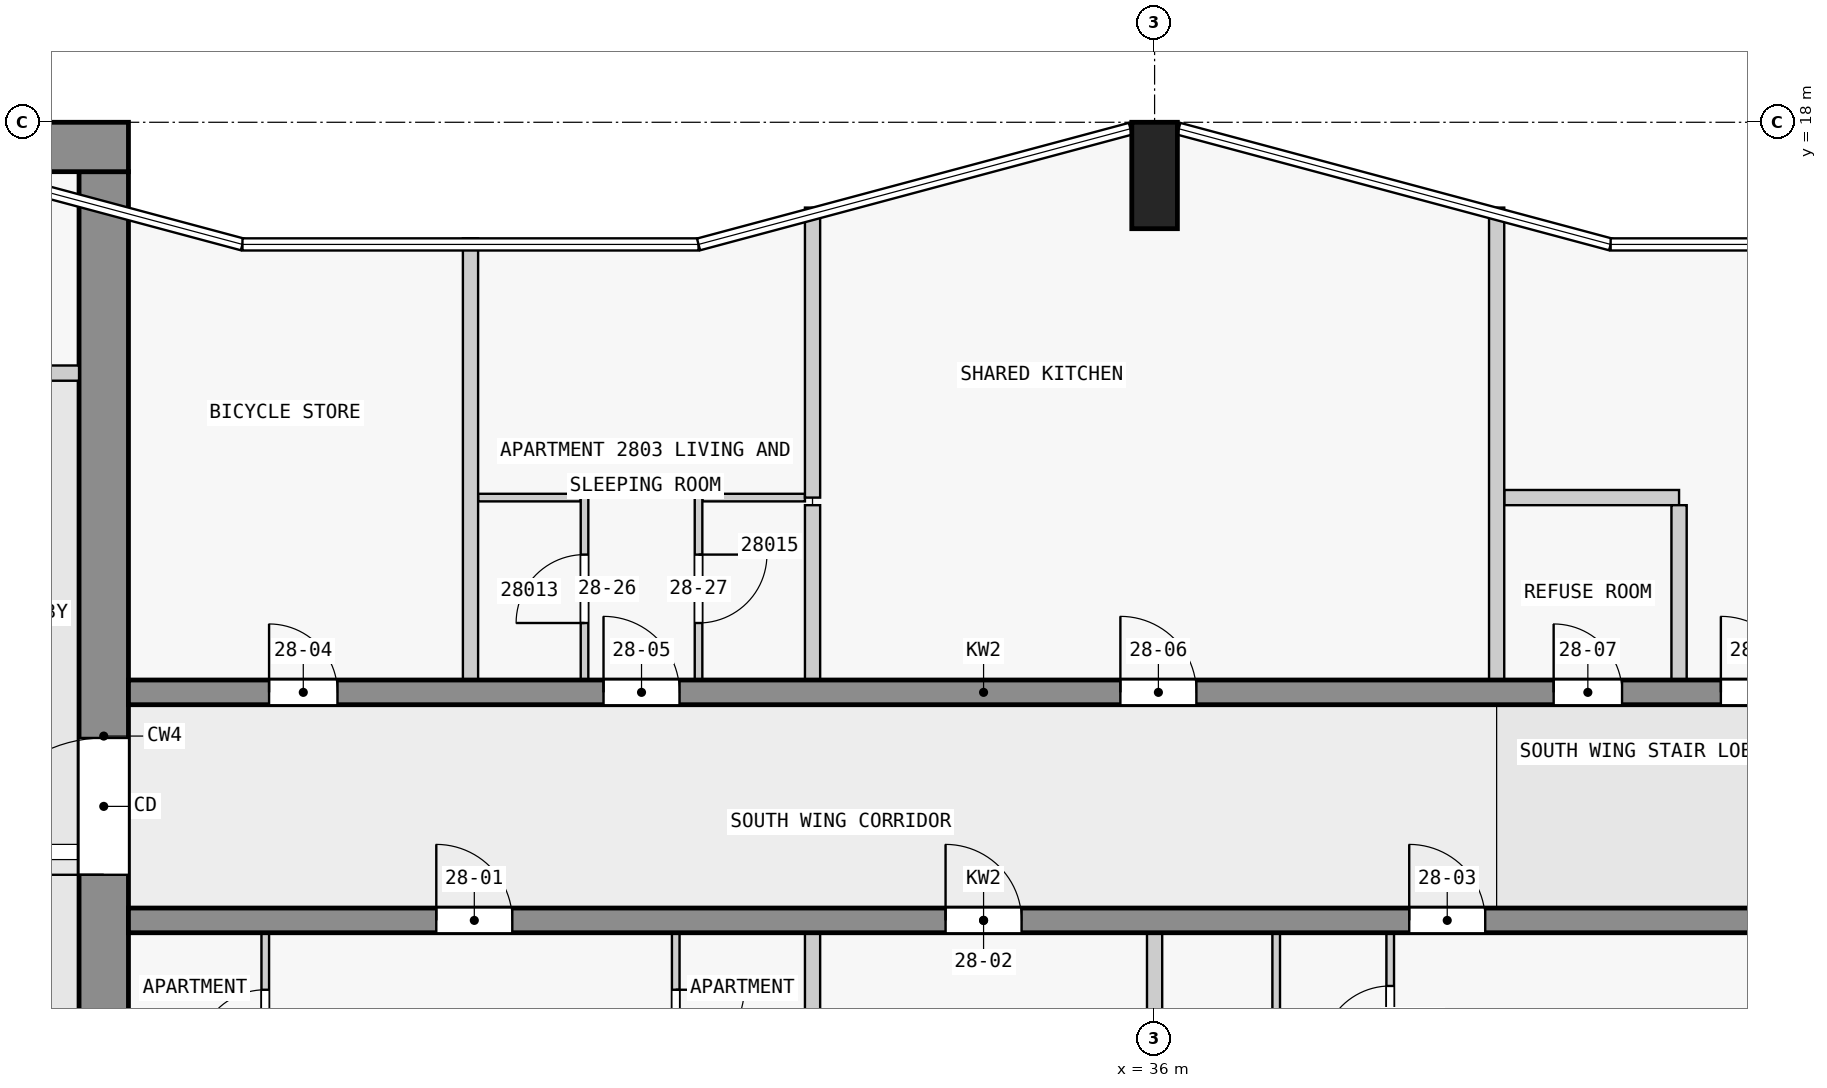
"""IFC4 building model, lengths in metres.
Left out: names, types, materials, properties, quantities, classifications, styles, units other than length and angle.
Written with IfcOpenShell. Run it as: python <this file> out.ifc"""

import sys

from ifc_helpers import new_model, si_unit, direction, frame, frame_2d, origin, origin_2d, place, context, subcontext, project, spatial, rectangle, extrude, element, fill, save


model = new_model("IFC4")
c1 = context("Model", 3, precision=1e-05, world=origin(), true_north=direction((0.0, 1.0)))
c2 = subcontext(c1, "Body", "Model", "MODEL_VIEW")
j1 = project(units=[si_unit("LENGTHUNIT", "METRE"), si_unit("PLANEANGLEUNIT", "RADIAN")], contexts=[c1])
p1 = place(None, origin())
s1 = spatial("IfcSite", under=j1, at=p1, CompositionType="ELEMENT")
p2 = place(p1, origin())
s2 = spatial("IfcBuilding", under=s1, at=p2, CompositionType="ELEMENT")
p3 = place(p2, frame((0.0, 0.0, 109.8)))
s3 = spatial("IfcBuildingStorey", under=s2, at=p3, CompositionType="ELEMENT", Elevation=109.8)
p4 = place(p3, frame((36.0, 17.3, 0.0), z_axis=(0.0, 0.0, 1.0), x_axis=(1.0, 0.0, 0.0)))
e1 = element("IfcColumn", 1, at=p4, inside=s3, PredefinedType="COLUMN", context=c2, shape_type="SweptSolid", body=[
    extrude(rectangle(XDim=0.6, YDim=1.4, at=origin_2d()), origin(), (0.0, 0.0, 1.0), 3.5),
])
p5 = place(p3, frame((1.65, 17.675, 0.0), z_axis=(0.0, 0.0, 1.0), x_axis=(1.0, 0.0, 0.0)))
e2 = element("IfcWall", 2, at=p5, inside=s3, PredefinedType="SHEAR", context=c2, shape_type="SweptSolid", body=[
    extrude(rectangle(XDim=20.85, YDim=0.65, at=frame_2d((10.425, 0.0))), origin(), (0.0, 0.0, 1.0), 3.25),
])
p6 = place(p5, frame((6.45, 0.0, 0.0)))
e3 = element("IfcOpeningElement", 3, at=p6, cuts=e2, PredefinedType="OPENING", context=c2, shape_type="SweptSolid", body=[
    extrude(rectangle(XDim=1.8, YDim=2.1, at=frame_2d((0.9, 1.05))), frame((0.0, 0.335, 0.0), z_axis=(0.0, -1.0, 0.0), x_axis=(1.0, 0.0, 0.0)), (0.0, 0.0, 1.0), 0.67),
])
p7 = place(p3, frame((22.175, 2.5, 0.0), z_axis=(0.0, 0.0, 1.0), x_axis=(0.0, 1.0, 0.0)))
e4 = element("IfcWall", 4, at=p7, inside=s3, PredefinedType="SHEAR", context=c2, shape_type="SweptSolid", body=[
    extrude(rectangle(XDim=14.85, YDim=0.65, at=frame_2d((7.425, 0.0))), origin(), (0.0, 0.0, 1.0), 3.25),
])
p8 = place(p7, frame((5.6, 0.0, 0.0)))
e5 = element("IfcOpeningElement", 5, at=p8, cuts=e4, PredefinedType="OPENING", context=c2, shape_type="SweptSolid", body=[
    extrude(rectangle(XDim=1.8, YDim=2.1, at=frame_2d((0.9, 1.05))), frame((0.0, 0.335, 0.0), z_axis=(0.0, -1.0, 0.0), x_axis=(1.0, 0.0, 0.0)), (0.0, 0.0, 1.0), 0.67),
])
p9 = place(p3, frame((22.5, 7.5, 0.0), z_axis=(0.0, 0.0, 1.0), x_axis=(1.0, 0.0, 0.0)))
e6 = element("IfcWall", 6, at=p9, inside=s3, PredefinedType="SHEAR", context=c2, shape_type="SweptSolid", body=[
    extrude(rectangle(XDim=22.5, YDim=0.325, at=frame_2d((11.25, 0.0))), origin(), (0.0, 0.0, 1.0), 3.25),
])
p10 = place(p9, frame((4.05, 0.0, 0.0)))
e7 = element("IfcOpeningElement", 7, at=p10, cuts=e6, PredefinedType="OPENING", context=c2, shape_type="SweptSolid", body=[
    extrude(rectangle(XDim=1.0, YDim=2.1, at=frame_2d((0.5, 1.05))), frame((0.0, 0.172, 0.0), z_axis=(0.0, -1.0, 0.0), x_axis=(1.0, 0.0, 0.0)), (0.0, 0.0, 1.0), 0.345),
])
p11 = place(p9, frame((10.75, 0.0, 0.0)))
e8 = element("IfcOpeningElement", 8, at=p11, cuts=e6, PredefinedType="OPENING", context=c2, shape_type="SweptSolid", body=[
    extrude(rectangle(XDim=1.0, YDim=2.1, at=frame_2d((0.5, 1.05))), frame((0.0, 0.172, 0.0), z_axis=(0.0, -1.0, 0.0), x_axis=(1.0, 0.0, 0.0)), (0.0, 0.0, 1.0), 0.345),
])
p12 = place(p9, frame((16.85, 0.0, 0.0)))
e9 = element("IfcOpeningElement", 9, at=p12, cuts=e6, PredefinedType="OPENING", context=c2, shape_type="SweptSolid", body=[
    extrude(rectangle(XDim=1.0, YDim=2.1, at=frame_2d((0.5, 1.05))), frame((0.0, 0.172, 0.0), z_axis=(0.0, -1.0, 0.0), x_axis=(1.0, 0.0, 0.0)), (0.0, 0.0, 1.0), 0.345),
])
p13 = place(p3, frame((22.5, 10.5, 0.0), z_axis=(0.0, 0.0, 1.0), x_axis=(1.0, 0.0, 0.0)))
e10 = element("IfcWall", 10, at=p13, inside=s3, PredefinedType="SHEAR", context=c2, shape_type="SweptSolid", body=[
    extrude(rectangle(XDim=22.5, YDim=0.325, at=frame_2d((11.25, 0.0))), origin(), (0.0, 0.0, 1.0), 3.25),
])
p14 = place(p13, frame((1.85, 0.0, 0.0)))
e11 = element("IfcOpeningElement", 11, at=p14, cuts=e10, PredefinedType="OPENING", context=c2, shape_type="SweptSolid", body=[
    extrude(rectangle(XDim=0.9, YDim=2.1, at=frame_2d((0.45, 1.05))), frame((0.0, 0.172, 0.0), z_axis=(0.0, -1.0, 0.0), x_axis=(1.0, 0.0, 0.0)), (0.0, 0.0, 1.0), 0.345),
])
p15 = place(p13, frame((6.25, 0.0, 0.0)))
e12 = element("IfcOpeningElement", 12, at=p15, cuts=e10, PredefinedType="OPENING", context=c2, shape_type="SweptSolid", body=[
    extrude(rectangle(XDim=1.0, YDim=2.1, at=frame_2d((0.5, 1.05))), frame((0.0, 0.172, 0.0), z_axis=(0.0, -1.0, 0.0), x_axis=(1.0, 0.0, 0.0)), (0.0, 0.0, 1.0), 0.345),
])
p16 = place(p13, frame((13.05, 0.0, 0.0)))
e13 = element("IfcOpeningElement", 13, at=p16, cuts=e10, PredefinedType="OPENING", context=c2, shape_type="SweptSolid", body=[
    extrude(rectangle(XDim=1.0, YDim=2.1, at=frame_2d((0.5, 1.05))), frame((0.0, 0.172, 0.0), z_axis=(0.0, -1.0, 0.0), x_axis=(1.0, 0.0, 0.0)), (0.0, 0.0, 1.0), 0.345),
])
p17 = place(p13, frame((18.75, 0.0, 0.0)))
e14 = element("IfcOpeningElement", 14, at=p17, cuts=e10, PredefinedType="OPENING", context=c2, shape_type="SweptSolid", body=[
    extrude(rectangle(XDim=0.9, YDim=2.1, at=frame_2d((0.45, 1.05))), frame((0.0, 0.172, 0.0), z_axis=(0.0, -1.0, 0.0), x_axis=(1.0, 0.0, 0.0)), (0.0, 0.0, 1.0), 0.345),
])
p18 = place(p13, frame((20.95, 0.0, 0.0)))
e15 = element("IfcOpeningElement", 15, at=p18, cuts=e10, PredefinedType="OPENING", context=c2, shape_type="SweptSolid", body=[
    extrude(rectangle(XDim=1.0, YDim=2.1, at=frame_2d((0.5, 1.05))), frame((0.0, 0.172, 0.0), z_axis=(0.0, -1.0, 0.0), x_axis=(1.0, 0.0, 0.0)), (0.0, 0.0, 1.0), 0.345),
])
p19 = place(p3, frame((18.6, 14.7, 0.0), z_axis=(0.0, 0.0, 1.0), x_axis=(1.0, 0.0, 0.0)))
e16 = element("IfcWall", 16, at=p19, inside=s3, PredefinedType="PARTITIONING", context=c2, shape_type="SweptSolid", body=[
    extrude(rectangle(XDim=3.25, YDim=0.2, at=frame_2d((1.625, 0.0))), origin(), (0.0, 0.0, 1.0), 3.25),
])
p20 = place(p19, frame((0.3, 0.0, 0.0)))
e17 = element("IfcOpeningElement", 17, at=p20, cuts=e16, PredefinedType="OPENING", context=c2, shape_type="SweptSolid", body=[
    extrude(rectangle(XDim=0.9, YDim=2.1, at=frame_2d((0.45, 1.05))), frame((0.0, 0.11, 0.0), z_axis=(0.0, -1.0, 0.0), x_axis=(1.0, 0.0, 0.0)), (0.0, 0.0, 1.0), 0.22),
])
p21 = place(p19, frame((1.925, 0.0, 0.0)))
e18 = element("IfcOpeningElement", 18, at=p21, cuts=e16, PredefinedType="OPENING", context=c2, shape_type="SweptSolid", body=[
    extrude(rectangle(XDim=0.9, YDim=2.1, at=frame_2d((0.45, 1.05))), frame((0.0, 0.11, 0.0), z_axis=(0.0, -1.0, 0.0), x_axis=(1.0, 0.0, 0.0)), (0.0, 0.0, 1.0), 0.22),
])
for number, where, z_axis, x_axis in (
    (19, (28.45, 13.062, 0.0), (0.0, 0.0, 1.0), (-1.0, 0.0, 0.0)),
    (20, (31.4, 13.062, 0.0), (0.0, 0.0, 1.0), (-1.0, 0.0, 0.0)),
):
    element("IfcWall", number, at=place(p3, frame(where, z_axis=z_axis, x_axis=x_axis)), inside=s3, PredefinedType="PARTITIONING", context=c2, shape_type="SweptSolid", body=[
        extrude(rectangle(XDim=1.35, YDim=0.1, at=frame_2d((0.675, 0.0))), origin(), (0.0, 0.0, 1.0), 3.25),
    ])
p22 = place(p3, frame((42.9, 13.062, 0.0), z_axis=(0.0, 0.0, 1.0), x_axis=(-1.0, 0.0, 0.0)))
e21 = element("IfcWall", 21, at=p22, inside=s3, PredefinedType="PARTITIONING", context=c2, shape_type="SweptSolid", body=[
    extrude(rectangle(XDim=2.3, YDim=0.2, at=frame_2d((1.15, 0.0))), origin(), (0.0, 0.0, 1.0), 3.25),
])
p23 = place(p3, frame((24.3, 4.938, 0.0), z_axis=(0.0, 0.0, 1.0), x_axis=(0.0, 1.0, 0.0)))
e22 = element("IfcWall", 22, at=p23, inside=s3, PredefinedType="PARTITIONING", context=c2, shape_type="SweptSolid", body=[
    extrude(rectangle(XDim=2.4, YDim=0.1, at=frame_2d((1.2, 0.0))), origin(), (0.0, 0.0, 1.0), 3.25),
])
p24 = place(p23, frame((0.75, 0.0, 0.0)))
e23 = element("IfcOpeningElement", 23, at=p24, cuts=e22, PredefinedType="OPENING", context=c2, shape_type="SweptSolid", body=[
    extrude(rectangle(XDim=0.9, YDim=2.1, at=frame_2d((0.45, 1.05))), frame((0.0, 0.06, 0.0), z_axis=(0.0, -1.0, 0.0), x_axis=(1.0, 0.0, 0.0)), (0.0, 0.0, 1.0), 0.12),
])
p25 = place(p3, frame((27.0, 10.663, 0.0), z_axis=(0.0, 0.0, 1.0), x_axis=(0.0, 1.0, 0.0)))
e24 = element("IfcWall", 24, at=p25, inside=s3, PredefinedType="PARTITIONING", context=c2, shape_type="SweptSolid", body=[
    extrude(rectangle(XDim=5.811, YDim=0.2, at=frame_2d((2.905, 0.0))), origin(), (0.0, 0.0, 1.0), 3.25),
])
p26 = place(p3, frame((28.5, 10.663, 0.0), z_axis=(0.0, 0.0, 1.0), x_axis=(0.0, 1.0, 0.0)))
e25 = element("IfcWall", 25, at=p26, inside=s3, PredefinedType="PARTITIONING", context=c2, shape_type="SweptSolid", body=[
    extrude(rectangle(XDim=2.4, YDim=0.1, at=frame_2d((1.2, 0.0))), origin(), (0.0, 0.0, 1.0), 3.25),
])
p27 = place(p26, frame((0.75, 0.0, 0.0)))
e26 = element("IfcOpeningElement", 26, at=p27, cuts=e25, PredefinedType="OPENING", context=c2, shape_type="SweptSolid", body=[
    extrude(rectangle(XDim=0.9, YDim=2.1, at=frame_2d((0.45, 1.05))), frame((0.0, 0.06, 0.0), z_axis=(0.0, -1.0, 0.0), x_axis=(1.0, 0.0, 0.0)), (0.0, 0.0, 1.0), 0.12),
])
p28 = place(p3, frame((29.7, 7.337, 0.0), z_axis=(0.0, 0.0, 1.0), x_axis=(0.0, -1.0, 0.0)))
e27 = element("IfcWall", 27, at=p28, inside=s3, PredefinedType="PARTITIONING", context=c2, shape_type="SweptSolid", body=[
    extrude(rectangle(XDim=2.35, YDim=0.1, at=frame_2d((1.175, 0.0))), origin(), (0.0, 0.0, 1.0), 3.25),
])
p29 = place(p28, frame((0.75, 0.0, 0.0)))
e28 = element("IfcOpeningElement", 28, at=p29, cuts=e27, PredefinedType="OPENING", context=c2, shape_type="SweptSolid", body=[
    extrude(rectangle(XDim=0.9, YDim=2.1, at=frame_2d((0.45, 1.05))), frame((0.0, 0.06, 0.0), z_axis=(0.0, -1.0, 0.0), x_axis=(1.0, 0.0, 0.0)), (0.0, 0.0, 1.0), 0.12),
])
p30 = place(p3, frame((30.0, 13.062, 0.0), z_axis=(0.0, 0.0, 1.0), x_axis=(0.0, -1.0, 0.0)))
e29 = element("IfcWall", 29, at=p30, inside=s3, PredefinedType="PARTITIONING", context=c2, shape_type="SweptSolid", body=[
    extrude(rectangle(XDim=2.4, YDim=0.1, at=frame_2d((1.2, 0.0))), origin(), (0.0, 0.0, 1.0), 3.25),
])
p31 = place(p30, frame((0.75, 0.0, 0.0)))
e30 = element("IfcOpeningElement", 30, at=p31, cuts=e29, PredefinedType="OPENING", context=c2, shape_type="SweptSolid", body=[
    extrude(rectangle(XDim=0.9, YDim=2.1, at=frame_2d((0.45, 1.05))), frame((0.0, 0.06, 0.0), z_axis=(0.0, -1.0, 0.0), x_axis=(1.0, 0.0, 0.0)), (0.0, 0.0, 1.0), 0.12),
])
p32 = place(p3, frame((31.5, 16.878, 0.0), z_axis=(0.0, 0.0, 1.0), x_axis=(0.0, -1.0, 0.0)))
e31 = element("IfcWall", 31, at=p32, inside=s3, PredefinedType="PARTITIONING", context=c2, shape_type="SweptSolid", body=[
    extrude(rectangle(XDim=3.815, YDim=0.2, at=frame_2d((1.908, 0.0))), origin(), (0.0, 0.0, 1.0), 3.25),
])
p33 = place(p3, frame((31.5, 1.122, 0.0), z_axis=(0.0, 0.0, 1.0), x_axis=(0.0, 1.0, 0.0)))
e32 = element("IfcWall", 32, at=p33, inside=s3, PredefinedType="PARTITIONING", context=c2, shape_type="SweptSolid", body=[
    extrude(rectangle(XDim=6.215, YDim=0.2, at=frame_2d((3.107, 0.0))), origin(), (0.0, 0.0, 1.0), 3.25),
])
p34 = place(p3, frame((31.5, 10.663, 0.0), z_axis=(0.0, 0.0, 1.0), x_axis=(0.0, 1.0, 0.0)))
e33 = element("IfcWall", 33, at=p34, inside=s3, PredefinedType="PARTITIONING", context=c2, shape_type="SweptSolid", body=[
    extrude(rectangle(XDim=2.3, YDim=0.2, at=frame_2d((1.15, 0.0))), origin(), (0.0, 0.0, 1.0), 3.25),
])
p35 = place(p3, frame((36.0, 1.4, 0.0), z_axis=(0.0, 0.0, 1.0), x_axis=(0.0, 1.0, 0.0)))
e34 = element("IfcWall", 34, at=p35, inside=s3, PredefinedType="PARTITIONING", context=c2, shape_type="SweptSolid", body=[
    extrude(rectangle(XDim=5.938, YDim=0.2, at=frame_2d((2.969, 0.0))), origin(), (0.0, 0.0, 1.0), 3.25),
])
p36 = place(p3, frame((37.6, 4.988, 0.0), z_axis=(0.0, 0.0, 1.0), x_axis=(0.0, 1.0, 0.0)))
e35 = element("IfcWall", 35, at=p36, inside=s3, PredefinedType="PARTITIONING", context=c2, shape_type="SweptSolid", body=[
    extrude(rectangle(XDim=2.35, YDim=0.1, at=frame_2d((1.175, 0.0))), origin(), (0.0, 0.0, 1.0), 3.25),
])
p37 = place(p3, frame((39.1, 4.988, 0.0), z_axis=(0.0, 0.0, 1.0), x_axis=(0.0, 1.0, 0.0)))
e36 = element("IfcWall", 36, at=p37, inside=s3, PredefinedType="PARTITIONING", context=c2, shape_type="SweptSolid", body=[
    extrude(rectangle(XDim=2.35, YDim=0.1, at=frame_2d((1.175, 0.0))), origin(), (0.0, 0.0, 1.0), 3.25),
])
p38 = place(p37, frame((0.75, 0.0, 0.0)))
e37 = element("IfcOpeningElement", 37, at=p38, cuts=e36, PredefinedType="OPENING", context=c2, shape_type="SweptSolid", body=[
    extrude(rectangle(XDim=0.9, YDim=2.1, at=frame_2d((0.45, 1.05))), frame((0.0, 0.06, 0.0), z_axis=(0.0, -1.0, 0.0), x_axis=(1.0, 0.0, 0.0)), (0.0, 0.0, 1.0), 0.12),
])
p39 = place(p3, frame((40.5, 10.663, 0.0), z_axis=(0.0, 0.0, 1.0), x_axis=(0.0, 1.0, 0.0)))
e38 = element("IfcWall", 38, at=p39, inside=s3, PredefinedType="PARTITIONING", context=c2, shape_type="SweptSolid", body=[
    extrude(rectangle(XDim=6.215, YDim=0.2, at=frame_2d((3.107, 0.0))), origin(), (0.0, 0.0, 1.0), 3.25),
])
p40 = place(p3, frame((42.9, 10.663, 0.0), z_axis=(0.0, 0.0, 1.0), x_axis=(0.0, 1.0, 0.0)))
e39 = element("IfcWall", 39, at=p40, inside=s3, PredefinedType="PARTITIONING", context=c2, shape_type="SweptSolid", body=[
    extrude(rectangle(XDim=2.3, YDim=0.2, at=frame_2d((1.15, 0.0))), origin(), (0.0, 0.0, 1.0), 3.25),
])
p41 = place(p8, origin())
e40 = element("IfcDoor", 40, at=p41, inside=s3, OperationType="DOUBLE_DOOR_SINGLE_SWING", PredefinedType="DOOR", context=c2, shape_type="SweptSolid", body=[
    extrude(rectangle(XDim=1.8, YDim=2.1, at=frame_2d((0.9, 1.05))), frame((0.0, 0.025, 0.0), z_axis=(0.0, -1.0, 0.0), x_axis=(1.0, 0.0, 0.0)), (0.0, 0.0, 1.0), 0.05),
])
fill(e5, e40)
p42 = place(p10, origin())
e41 = element("IfcDoor", 41, at=p42, inside=s3, OperationType="SINGLE_SWING_LEFT", PredefinedType="DOOR", context=c2, shape_type="SweptSolid", body=[
    extrude(rectangle(XDim=1.0, YDim=2.1, at=frame_2d((0.5, 1.05))), frame((0.0, 0.025, 0.0), z_axis=(0.0, -1.0, 0.0), x_axis=(1.0, 0.0, 0.0)), (0.0, 0.0, 1.0), 0.05),
])
fill(e7, e41)
p43 = place(p11, origin())
e42 = element("IfcDoor", 42, at=p43, inside=s3, OperationType="SINGLE_SWING_LEFT", PredefinedType="DOOR", context=c2, shape_type="SweptSolid", body=[
    extrude(rectangle(XDim=1.0, YDim=2.1, at=frame_2d((0.5, 1.05))), frame((0.0, 0.025, 0.0), z_axis=(0.0, -1.0, 0.0), x_axis=(1.0, 0.0, 0.0)), (0.0, 0.0, 1.0), 0.05),
])
fill(e8, e42)
p44 = place(p12, origin())
e43 = element("IfcDoor", 43, at=p44, inside=s3, OperationType="SINGLE_SWING_RIGHT", PredefinedType="DOOR", context=c2, shape_type="SweptSolid", body=[
    extrude(rectangle(XDim=1.0, YDim=2.1, at=frame_2d((0.5, 1.05))), frame((0.0, 0.025, 0.0), z_axis=(0.0, -1.0, 0.0), x_axis=(1.0, 0.0, 0.0)), (0.0, 0.0, 1.0), 0.05),
])
fill(e9, e43)
p45 = place(p14, origin())
e44 = element("IfcDoor", 44, at=p45, inside=s3, OperationType="SINGLE_SWING_LEFT", PredefinedType="DOOR", context=c2, shape_type="SweptSolid", body=[
    extrude(rectangle(XDim=0.9, YDim=2.1, at=frame_2d((0.45, 1.05))), frame((0.0, 0.025, 0.0), z_axis=(0.0, -1.0, 0.0), x_axis=(1.0, 0.0, 0.0)), (0.0, 0.0, 1.0), 0.05),
])
fill(e11, e44)
p46 = place(p15, origin())
e45 = element("IfcDoor", 45, at=p46, inside=s3, OperationType="SINGLE_SWING_LEFT", PredefinedType="DOOR", context=c2, shape_type="SweptSolid", body=[
    extrude(rectangle(XDim=1.0, YDim=2.1, at=frame_2d((0.5, 1.05))), frame((0.0, 0.025, 0.0), z_axis=(0.0, -1.0, 0.0), x_axis=(1.0, 0.0, 0.0)), (0.0, 0.0, 1.0), 0.05),
])
fill(e12, e45)
p47 = place(p16, origin())
e46 = element("IfcDoor", 46, at=p47, inside=s3, OperationType="SINGLE_SWING_RIGHT", PredefinedType="DOOR", context=c2, shape_type="SweptSolid", body=[
    extrude(rectangle(XDim=1.0, YDim=2.1, at=frame_2d((0.5, 1.05))), frame((0.0, 0.025, 0.0), z_axis=(0.0, -1.0, 0.0), x_axis=(1.0, 0.0, 0.0)), (0.0, 0.0, 1.0), 0.05),
])
fill(e13, e46)
p48 = place(p17, origin())
e47 = element("IfcDoor", 47, at=p48, inside=s3, OperationType="SINGLE_SWING_RIGHT", PredefinedType="DOOR", context=c2, shape_type="SweptSolid", body=[
    extrude(rectangle(XDim=0.9, YDim=2.1, at=frame_2d((0.45, 1.05))), frame((0.0, 0.025, 0.0), z_axis=(0.0, -1.0, 0.0), x_axis=(1.0, 0.0, 0.0)), (0.0, 0.0, 1.0), 0.05),
])
fill(e14, e47)
p49 = place(p18, origin())
e48 = element("IfcDoor", 48, at=p49, inside=s3, OperationType="SINGLE_SWING_RIGHT", PredefinedType="DOOR", context=c2, shape_type="SweptSolid", body=[
    extrude(rectangle(XDim=1.0, YDim=2.1, at=frame_2d((0.5, 1.05))), frame((0.0, 0.025, 0.0), z_axis=(0.0, -1.0, 0.0), x_axis=(1.0, 0.0, 0.0)), (0.0, 0.0, 1.0), 0.05),
])
fill(e15, e48)
p50 = place(p24, origin())
e49 = element("IfcDoor", 49, at=p50, inside=s3, OperationType="SINGLE_SWING_LEFT", PredefinedType="DOOR", context=c2, shape_type="SweptSolid", body=[
    extrude(rectangle(XDim=0.9, YDim=2.1, at=frame_2d((0.45, 1.05))), frame((0.0, 0.025, 0.0), z_axis=(0.0, -1.0, 0.0), x_axis=(1.0, 0.0, 0.0)), (0.0, 0.0, 1.0), 0.05),
])
fill(e23, e49)
p51 = place(p29, origin())
e50 = element("IfcDoor", 50, at=p51, inside=s3, OperationType="SINGLE_SWING_RIGHT", PredefinedType="DOOR", context=c2, shape_type="SweptSolid", body=[
    extrude(rectangle(XDim=0.9, YDim=2.1, at=frame_2d((0.45, 1.05))), frame((0.0, 0.025, 0.0), z_axis=(0.0, -1.0, 0.0), x_axis=(1.0, 0.0, 0.0)), (0.0, 0.0, 1.0), 0.05),
])
fill(e28, e50)
p52 = place(p38, origin())
e51 = element("IfcDoor", 51, at=p52, inside=s3, OperationType="SINGLE_SWING_RIGHT", PredefinedType="DOOR", context=c2, shape_type="SweptSolid", body=[
    extrude(rectangle(XDim=0.9, YDim=2.1, at=frame_2d((0.45, 1.05))), frame((0.0, 0.025, 0.0), z_axis=(0.0, -1.0, 0.0), x_axis=(1.0, 0.0, 0.0)), (0.0, 0.0, 1.0), 0.05),
])
fill(e37, e51)
p53 = place(p27, origin())
e52 = element("IfcDoor", 52, at=p53, inside=s3, OperationType="SINGLE_SWING_LEFT", PredefinedType="DOOR", context=c2, shape_type="SweptSolid", body=[
    extrude(rectangle(XDim=0.9, YDim=2.1, at=frame_2d((0.45, 1.05))), frame((0.0, 0.025, 0.0), z_axis=(0.0, -1.0, 0.0), x_axis=(1.0, 0.0, 0.0)), (0.0, 0.0, 1.0), 0.05),
])
fill(e26, e52)
p54 = place(p31, origin())
e53 = element("IfcDoor", 53, at=p54, inside=s3, OperationType="SINGLE_SWING_LEFT", PredefinedType="DOOR", context=c2, shape_type="SweptSolid", body=[
    extrude(rectangle(XDim=0.9, YDim=2.1, at=frame_2d((0.45, 1.05))), frame((0.0, 0.025, 0.0), z_axis=(0.0, -1.0, 0.0), x_axis=(1.0, 0.0, 0.0)), (0.0, 0.0, 1.0), 0.05),
])
fill(e30, e53)
save(model, sys.argv[1])
